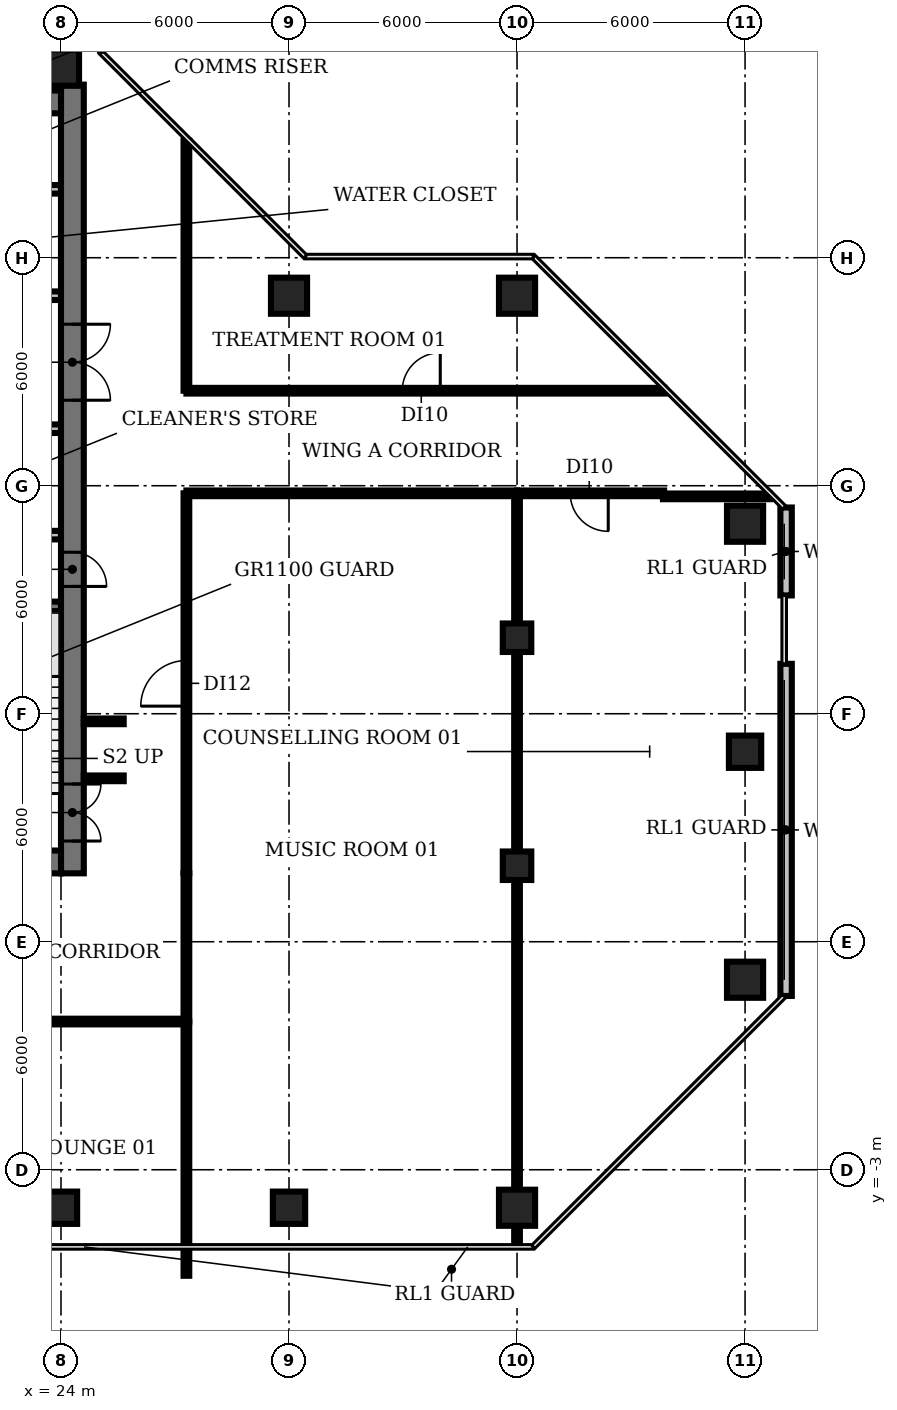
"""IFC4 building model, lengths in metres.
Left out: names, types, materials, properties, quantities, classifications, styles, units other than length and angle.
Written with IfcOpenShell. Run it as: python <this file> out.ifc"""

import sys

from ifc_helpers import new_model, si_unit, direction, frame, frame_2d, origin, origin_2d, place, context, subcontext, project, spatial, rectangle, circle, extrude, element, fill, save


model = new_model("IFC4")
c1 = context("Model", 3, precision=1e-05, world=origin(), true_north=direction((0.0, 1.0)))
c2 = subcontext(c1, "Body", "Model", "MODEL_VIEW")
j1 = project(units=[si_unit("LENGTHUNIT", "METRE"), si_unit("PLANEANGLEUNIT", "RADIAN")], contexts=[c1])
p1 = place(None, origin())
s1 = spatial("IfcSite", under=j1, at=p1, CompositionType="ELEMENT")
p2 = place(p1, origin())
s2 = spatial("IfcBuilding", under=s1, at=p2, CompositionType="ELEMENT")
p3 = place(p2, frame((0.0, 0.0, 150.8)))
s3 = spatial("IfcBuildingStorey", under=s2, at=p3, CompositionType="ELEMENT", Elevation=150.8)
p4 = place(p3, frame((24.0, -4.0, 0.0), z_axis=(0.0, 0.0, 1.0), x_axis=(1.0, 0.0, 0.0)))
e1 = element("IfcColumn", 1, at=p4, inside=s3, PredefinedType="COLUMN", context=c2, shape_type="SweptSolid", body=[
    extrude(rectangle(XDim=0.85, YDim=0.85, at=origin_2d()), origin(), (0.0, 0.0, 1.0), 3.85),
])
p5 = place(p3, frame((24.0, 26.0, 0.0), z_axis=(0.0, 0.0, 1.0), x_axis=(1.0, 0.0, 0.0)))
e2 = element("IfcColumn", 2, at=p5, inside=s3, PredefinedType="COLUMN", context=c2, shape_type="SweptSolid", body=[
    extrude(circle(Radius=0.475, at=origin_2d()), origin(), (0.0, 0.0, 1.0), 3.85),
])
p6 = place(p3, frame((30.0, -4.0, 0.0), z_axis=(0.0, 0.0, 1.0), x_axis=(1.0, 0.0, 0.0)))
e3 = element("IfcColumn", 3, at=p6, inside=s3, PredefinedType="COLUMN", context=c2, shape_type="SweptSolid", body=[
    extrude(rectangle(XDim=0.85, YDim=0.85, at=origin_2d()), origin(), (0.0, 0.0, 1.0), 3.85),
])
for number, where, z_axis, x_axis in (
    (4, (30.0, 20.0, 0.0), (0.0, 0.0, 1.0), (1.0, 0.0, 0.0)),
    (5, (36.0, -4.0, 0.0), (0.0, 0.0, 1.0), (1.0, 0.0, 0.0)),
):
    element("IfcColumn", number, at=place(p3, frame(where, z_axis=z_axis, x_axis=x_axis)), inside=s3, PredefinedType="COLUMN", context=c2, shape_type="SweptSolid", body=[
        extrude(circle(Radius=0.475, at=origin_2d()), origin(), (0.0, 0.0, 1.0), 3.85),
    ])
for number, where, z_axis, x_axis in (
    (6, (36.0, 5.0, 0.0), (0.0, 0.0, 1.0), (1.0, 0.0, 0.0)),
    (7, (36.0, 11.0, 0.0), (0.0, 0.0, 1.0), (1.0, 0.0, 0.0)),
):
    element("IfcColumn", number, at=place(p3, frame(where, z_axis=z_axis, x_axis=x_axis)), inside=s3, PredefinedType="COLUMN", context=c2, shape_type="SweptSolid", body=[
        extrude(rectangle(XDim=0.75, YDim=0.75, at=origin_2d()), origin(), (0.0, 0.0, 1.0), 3.85),
    ])
for number, where, z_axis, x_axis in (
    (8, (36.0, 20.0, 0.0), (0.0, 0.0, 1.0), (1.0, 0.0, 0.0)),
    (9, (42.0, 2.0, 0.0), (0.0, 0.0, 1.0), (1.0, 0.0, 0.0)),
):
    element("IfcColumn", number, at=place(p3, frame(where, z_axis=z_axis, x_axis=x_axis)), inside=s3, PredefinedType="COLUMN", context=c2, shape_type="SweptSolid", body=[
        extrude(circle(Radius=0.475, at=origin_2d()), origin(), (0.0, 0.0, 1.0), 3.85),
    ])
p7 = place(p3, frame((42.0, 8.0, 0.0), z_axis=(0.0, 0.0, 1.0), x_axis=(1.0, 0.0, 0.0)))
e10 = element("IfcColumn", 10, at=p7, inside=s3, PredefinedType="COLUMN", context=c2, shape_type="SweptSolid", body=[
    extrude(rectangle(XDim=0.85, YDim=0.85, at=origin_2d()), origin(), (0.0, 0.0, 1.0), 3.85),
])
p8 = place(p3, frame((42.0, 14.0, 0.0), z_axis=(0.0, 0.0, 1.0), x_axis=(1.0, 0.0, 0.0)))
e11 = element("IfcColumn", 11, at=p8, inside=s3, PredefinedType="COLUMN", context=c2, shape_type="SweptSolid", body=[
    extrude(circle(Radius=0.475, at=origin_2d()), origin(), (0.0, 0.0, 1.0), 3.85),
])
p9 = place(p3, frame((43.08, 1.573, 0.0), z_axis=(0.0, 0.0, 1.0), x_axis=(0.0, 1.0, 0.0)))
e12 = element("IfcWall", 12, at=p9, inside=s3, PredefinedType="SOLIDWALL", context=c2, shape_type="SweptSolid", body=[
    extrude(rectangle(XDim=8.74, YDim=0.3, at=frame_2d((4.37, 0.0))), origin(), (0.0, 0.0, 1.0), 3.85),
])
p10 = place(p3, frame((43.08, 12.113, 0.0), z_axis=(0.0, 0.0, 1.0), x_axis=(0.0, 1.0, 0.0)))
e13 = element("IfcWall", 13, at=p10, inside=s3, PredefinedType="SOLIDWALL", context=c2, shape_type="SweptSolid", body=[
    extrude(rectangle(XDim=2.313, YDim=0.3, at=frame_2d((1.157, 0.0))), origin(), (0.0, 0.0, 1.0), 3.85),
])
p11 = place(p3, frame((20.85, 11.825, 0.0), z_axis=(0.0, 0.0, 1.0), x_axis=(1.0, 0.0, 0.0)))
e14 = element("IfcWall", 14, at=p11, inside=s3, PredefinedType="SHEAR", context=c2, shape_type="SweptSolid", body=[
    extrude(rectangle(XDim=3.15, YDim=0.25, at=frame_2d((1.575, 0.0))), origin(), (0.0, 0.0, 1.0), 3.85),
])
p12 = place(p3, frame((16.6, 13.7, 0.0), z_axis=(0.0, 0.0, 1.0), x_axis=(1.0, 0.0, 0.0)))
e15 = element("IfcWall", 15, at=p12, inside=s3, PredefinedType="PARTITIONING", context=c2, shape_type="SweptSolid", body=[
    extrude(rectangle(XDim=7.4, YDim=0.225, at=frame_2d((3.7, 0.0))), origin(), (0.0, 0.0, 1.0), 3.85),
])
p13 = place(p3, frame((9.4, 16.5, 0.0), z_axis=(0.0, 0.0, 1.0), x_axis=(1.0, 0.0, 0.0)))
e16 = element("IfcWall", 16, at=p13, inside=s3, PredefinedType="PARTITIONING", context=c2, shape_type="SweptSolid", body=[
    extrude(rectangle(XDim=14.6, YDim=0.225, at=frame_2d((7.3, 0.0))), origin(), (0.0, 0.0, 1.0), 3.85),
])
p14 = place(p13, frame((1.9, 0.0, 0.0)))
e17 = element("IfcOpeningElement", 17, at=p14, cuts=e16, PredefinedType="OPENING", context=c2, shape_type="SweptSolid", body=[
    extrude(rectangle(XDim=1.0, YDim=2.1, at=frame_2d((0.5, 1.05))), frame((0.0, 0.123, 0.0), z_axis=(0.0, -1.0, 0.0), x_axis=(1.0, 0.0, 0.0)), (0.0, 0.0, 1.0), 0.245),
])
p15 = place(p13, frame((7.475, 0.0, 0.0)))
e18 = element("IfcOpeningElement", 18, at=p15, cuts=e16, PredefinedType="OPENING", context=c2, shape_type="SweptSolid", body=[
    extrude(rectangle(XDim=1.0, YDim=2.1, at=frame_2d((0.5, 1.05))), frame((0.0, 0.123, 0.0), z_axis=(0.0, -1.0, 0.0), x_axis=(1.0, 0.0, 0.0)), (0.0, 0.0, 1.0), 0.245),
])
p16 = place(p13, frame((12.4, 0.0, 0.0)))
e19 = element("IfcOpeningElement", 19, at=p16, cuts=e16, PredefinedType="OPENING", context=c2, shape_type="SweptSolid", body=[
    extrude(rectangle(XDim=1.0, YDim=2.1, at=frame_2d((0.5, 1.05))), frame((0.0, 0.123, 0.0), z_axis=(0.0, -1.0, 0.0), x_axis=(1.0, 0.0, 0.0)), (0.0, 0.0, 1.0), 0.245),
])
p17 = place(p3, frame((24.0, 20.0, 0.0), z_axis=(0.0, 0.0, 1.0), x_axis=(-1.0, 0.0, 0.0)))
e20 = element("IfcWall", 20, at=p17, inside=s3, PredefinedType="PARTITIONING", context=c2, shape_type="SweptSolid", body=[
    extrude(rectangle(XDim=14.6, YDim=0.225, at=frame_2d((7.3, 0.0))), origin(), (0.0, 0.0, 1.0), 3.85),
])
p18 = place(p17, frame((12.75, 0.0, 0.0)))
e21 = element("IfcOpeningElement", 21, at=p18, cuts=e20, PredefinedType="OPENING", context=c2, shape_type="SweptSolid", body=[
    extrude(rectangle(XDim=1.1, YDim=2.1, at=frame_2d((0.55, 1.05))), frame((0.0, 0.123, 0.0), z_axis=(0.0, -1.0, 0.0), x_axis=(1.0, 0.0, 0.0)), (0.0, 0.0, 1.0), 0.245),
])
p19 = place(p17, frame((9.95, 0.0, 0.0)))
e22 = element("IfcOpeningElement", 22, at=p19, cuts=e20, PredefinedType="OPENING", context=c2, shape_type="SweptSolid", body=[
    extrude(rectangle(XDim=1.1, YDim=2.1, at=frame_2d((0.55, 1.05))), frame((0.0, 0.123, 0.0), z_axis=(0.0, -1.0, 0.0), x_axis=(1.0, 0.0, 0.0)), (0.0, 0.0, 1.0), 0.245),
])
p20 = place(p17, frame((7.15, 0.0, 0.0)))
e23 = element("IfcOpeningElement", 23, at=p20, cuts=e20, PredefinedType="OPENING", context=c2, shape_type="SweptSolid", body=[
    extrude(rectangle(XDim=1.1, YDim=2.1, at=frame_2d((0.55, 1.05))), frame((0.0, 0.123, 0.0), z_axis=(0.0, -1.0, 0.0), x_axis=(1.0, 0.0, 0.0)), (0.0, 0.0, 1.0), 0.245),
])
p21 = place(p17, frame((4.35, 0.0, 0.0)))
e24 = element("IfcOpeningElement", 24, at=p21, cuts=e20, PredefinedType="OPENING", context=c2, shape_type="SweptSolid", body=[
    extrude(rectangle(XDim=1.1, YDim=2.1, at=frame_2d((0.55, 1.05))), frame((0.0, 0.123, 0.0), z_axis=(0.0, -1.0, 0.0), x_axis=(1.0, 0.0, 0.0)), (0.0, 0.0, 1.0), 0.245),
])
p22 = place(p17, frame((1.2, 0.0, 0.0)))
e25 = element("IfcOpeningElement", 25, at=p22, cuts=e20, PredefinedType="OPENING", context=c2, shape_type="SweptSolid", body=[
    extrude(rectangle(XDim=1.0, YDim=2.1, at=frame_2d((0.5, 1.05))), frame((0.0, 0.123, 0.0), z_axis=(0.0, -1.0, 0.0), x_axis=(1.0, 0.0, 0.0)), (0.0, 0.0, 1.0), 0.245),
])
p23 = place(p3, frame((9.4, 22.8, 0.0), z_axis=(0.0, 0.0, 1.0), x_axis=(1.0, 0.0, 0.0)))
e26 = element("IfcWall", 26, at=p23, inside=s3, PredefinedType="PARTITIONING", context=c2, shape_type="SweptSolid", body=[
    extrude(rectangle(XDim=14.6, YDim=0.225, at=frame_2d((7.3, 0.0))), origin(), (0.0, 0.0, 1.0), 3.85),
])
p24 = place(p3, frame((24.3, 25.555, 0.0), z_axis=(0.0, 0.0, 1.0), x_axis=(0.0, -1.0, 0.0)))
e27 = element("IfcWall", 27, at=p24, inside=s3, PredefinedType="SHEAR", context=c2, shape_type="SweptSolid", body=[
    extrude(rectangle(XDim=20.755, YDim=0.6, at=frame_2d((10.377, 0.0))), origin(), (0.0, 0.0, 1.0), 3.85),
])
p25 = place(p24, frame((18.405, 0.0, 0.0)))
e28 = element("IfcOpeningElement", 28, at=p25, cuts=e27, PredefinedType="OPENING", context=c2, shape_type="SweptSolid", body=[
    extrude(rectangle(XDim=1.5, YDim=2.1, at=frame_2d((0.75, 1.05))), frame((0.0, 0.31, 0.0), z_axis=(0.0, -1.0, 0.0), x_axis=(1.0, 0.0, 0.0)), (0.0, 0.0, 1.0), 0.62),
])
p26 = place(p24, frame((12.305, 0.0, 0.0)))
e29 = element("IfcOpeningElement", 29, at=p26, cuts=e27, PredefinedType="OPENING", context=c2, shape_type="SweptSolid", body=[
    extrude(rectangle(XDim=0.9, YDim=2.1, at=frame_2d((0.45, 1.05))), frame((0.0, 0.31, 0.0), z_axis=(0.0, -1.0, 0.0), x_axis=(1.0, 0.0, 0.0)), (0.0, 0.0, 1.0), 0.62),
])
p27 = place(p24, frame((6.305, 0.0, 0.0)))
e30 = element("IfcOpeningElement", 30, at=p27, cuts=e27, PredefinedType="OPENING", context=c2, shape_type="SweptSolid", body=[
    extrude(rectangle(XDim=2.0, YDim=2.1, at=frame_2d((1.0, 1.05))), frame((0.0, 0.31, 0.0), z_axis=(0.0, -1.0, 0.0), x_axis=(1.0, 0.0, 0.0)), (0.0, 0.0, 1.0), 0.62),
])
p28 = place(p3, frame((24.0, 5.1, 0.0), z_axis=(0.0, 0.0, 1.0), x_axis=(-1.0, 0.0, 0.0)))
e31 = element("IfcWall", 31, at=p28, inside=s3, PredefinedType="SHEAR", context=c2, shape_type="SweptSolid", body=[
    extrude(rectangle(XDim=18.0, YDim=0.6, at=frame_2d((9.0, 0.0))), origin(), (0.0, 0.0, 1.0), 3.85),
])
p29 = place(p28, frame((13.0, 0.0, 0.0)))
e32 = element("IfcOpeningElement", 32, at=p29, cuts=e31, PredefinedType="OPENING", context=c2, shape_type="SweptSolid", body=[
    extrude(rectangle(XDim=1.2, YDim=2.1, at=frame_2d((0.6, 1.05))), frame((0.0, 0.31, 0.0), z_axis=(0.0, -1.0, 0.0), x_axis=(1.0, 0.0, 0.0)), (0.0, 0.0, 1.0), 0.62),
])
p30 = place(p28, frame((4.9, 0.0, 0.0)))
e33 = element("IfcOpeningElement", 33, at=p30, cuts=e31, PredefinedType="OPENING", context=c2, shape_type="SweptSolid", body=[
    extrude(rectangle(XDim=1.0, YDim=2.1, at=frame_2d((0.5, 1.05))), frame((0.0, 0.31, 0.0), z_axis=(0.0, -1.0, 0.0), x_axis=(1.0, 0.0, 0.0)), (0.0, 0.0, 1.0), 0.62),
])
p31 = place(p3, frame((6.0, 25.1, 0.0), z_axis=(0.0, 0.0, 1.0), x_axis=(1.0, 0.0, 0.0)))
e34 = element("IfcWall", 34, at=p31, inside=s3, PredefinedType="SHEAR", context=c2, shape_type="SweptSolid", body=[
    extrude(rectangle(XDim=18.0, YDim=0.6, at=frame_2d((9.0, 0.0))), origin(), (0.0, 0.0, 1.0), 3.85),
])
for number, where, z_axis, x_axis in (
    (35, (24.6, 7.3, 0.0), (0.0, 0.0, 1.0), (1.0, 0.0, 0.0)),
    (36, (24.6, 8.8, 0.0), (0.0, 0.0, 1.0), (1.0, 0.0, 0.0)),
):
    element("IfcWall", number, at=place(p3, frame(where, z_axis=z_axis, x_axis=x_axis)), inside=s3, PredefinedType="PARTITIONING", context=c2, shape_type="SweptSolid", body=[
        extrude(rectangle(XDim=1.05, YDim=0.15, at=frame_2d((0.525, 0.0))), origin(), (0.0, 0.0, 1.0), 2.88),
    ])
p32 = place(p3, frame((27.3, -5.79, 0.0), z_axis=(0.0, 0.0, 1.0), x_axis=(0.0, 1.0, 0.0)))
e37 = element("IfcWall", 37, at=p32, inside=s3, PredefinedType="PARTITIONING", context=c2, shape_type="SweptSolid", body=[
    extrude(rectangle(XDim=6.69, YDim=0.15, at=frame_2d((3.345, 0.0))), origin(), (0.0, 0.0, 1.0), 2.88),
])
p33 = place(p3, frame((27.3, 0.9, 0.0), z_axis=(0.0, 0.0, 1.0), x_axis=(-1.0, 0.0, 0.0)))
e38 = element("IfcWall", 38, at=p33, inside=s3, PredefinedType="PARTITIONING", context=c2, shape_type="SweptSolid", body=[
    extrude(rectangle(XDim=24.6, YDim=0.15, at=frame_2d((12.3, 0.0))), origin(), (0.0, 0.0, 1.0), 2.88),
])
p34 = place(p33, frame((11.8, 0.0, 0.0)))
e39 = element("IfcOpeningElement", 39, at=p34, cuts=e38, PredefinedType="OPENING", context=c2, shape_type="SweptSolid", body=[
    extrude(rectangle(XDim=1.2, YDim=2.1, at=frame_2d((0.6, 1.05))), frame((0.0, 0.085, 0.0), z_axis=(0.0, -1.0, 0.0), x_axis=(1.0, 0.0, 0.0)), (0.0, 0.0, 1.0), 0.17),
])
p35 = place(p3, frame((27.3, 0.9, 0.0), z_axis=(0.0, 0.0, 1.0), x_axis=(0.0, 1.0, 0.0)))
e40 = element("IfcWall", 40, at=p35, inside=s3, PredefinedType="PARTITIONING", context=c2, shape_type="SweptSolid", body=[
    extrude(rectangle(XDim=3.9, YDim=0.15, at=frame_2d((1.95, 0.0))), origin(), (0.0, 0.0, 1.0), 2.88),
])
p36 = place(p3, frame((27.3, 4.8, 0.0), z_axis=(0.0, 0.0, 1.0), x_axis=(0.0, 1.0, 0.0)))
e41 = element("IfcWall", 41, at=p36, inside=s3, PredefinedType="PARTITIONING", context=c2, shape_type="SweptSolid", body=[
    extrude(rectangle(XDim=10.0, YDim=0.15, at=frame_2d((5.0, 0.0))), origin(), (0.0, 0.0, 1.0), 2.88),
])
p37 = place(p36, frame((4.4, 0.0, 0.0)))
e42 = element("IfcOpeningElement", 42, at=p37, cuts=e41, PredefinedType="OPENING", context=c2, shape_type="SweptSolid", body=[
    extrude(rectangle(XDim=1.2, YDim=2.1, at=frame_2d((0.6, 1.05))), frame((0.0, 0.085, 0.0), z_axis=(0.0, -1.0, 0.0), x_axis=(1.0, 0.0, 0.0)), (0.0, 0.0, 1.0), 0.17),
])
p38 = place(p3, frame((27.3, 14.8, 0.0), z_axis=(0.0, 0.0, 1.0), x_axis=(1.0, 0.0, 0.0)))
e43 = element("IfcWall", 43, at=p38, inside=s3, PredefinedType="PARTITIONING", context=c2, shape_type="SweptSolid", body=[
    extrude(rectangle(XDim=8.7, YDim=0.15, at=frame_2d((4.35, 0.0))), origin(), (0.0, 0.0, 1.0), 2.88),
])
p39 = place(p3, frame((27.3, 17.5, 0.0), z_axis=(0.0, 0.0, 1.0), x_axis=(0.0, 1.0, 0.0)))
e44 = element("IfcWall", 44, at=p39, inside=s3, PredefinedType="PARTITIONING", context=c2, shape_type="SweptSolid", body=[
    extrude(rectangle(XDim=6.58, YDim=0.15, at=frame_2d((3.29, 0.0))), origin(), (0.0, 0.0, 1.0), 2.88),
])
p40 = place(p3, frame((27.3, 17.5, 0.0), z_axis=(0.0, 0.0, 1.0), x_axis=(1.0, 0.0, 0.0)))
e45 = element("IfcWall", 45, at=p40, inside=s3, PredefinedType="PARTITIONING", context=c2, shape_type="SweptSolid", body=[
    extrude(rectangle(XDim=12.58, YDim=0.15, at=frame_2d((6.29, 0.0))), origin(), (0.0, 0.0, 1.0), 2.88),
])
p41 = place(p40, frame((5.68, 0.0, 0.0)))
e46 = element("IfcOpeningElement", 46, at=p41, cuts=e45, PredefinedType="OPENING", context=c2, shape_type="SweptSolid", body=[
    extrude(rectangle(XDim=1.0, YDim=2.1, at=frame_2d((0.5, 1.05))), frame((0.0, 0.085, 0.0), z_axis=(0.0, -1.0, 0.0), x_axis=(1.0, 0.0, 0.0)), (0.0, 0.0, 1.0), 0.17),
])
p42 = place(p3, frame((36.0, -4.97, 0.0), z_axis=(0.0, 0.0, 1.0), x_axis=(0.0, 1.0, 0.0)))
e47 = element("IfcWall", 47, at=p42, inside=s3, PredefinedType="PARTITIONING", context=c2, shape_type="SweptSolid", body=[
    extrude(rectangle(XDim=19.77, YDim=0.15, at=frame_2d((9.885, 0.0))), origin(), (0.0, 0.0, 1.0), 2.88),
])
p43 = place(p3, frame((39.84, 14.72, 0.0), z_axis=(0.0, 0.0, 1.0), x_axis=(1.0, 0.0, 0.0)))
e48 = element("IfcWall", 48, at=p43, inside=s3, PredefinedType="PARTITIONING", context=c2, shape_type="SweptSolid", body=[
    extrude(rectangle(XDim=2.812, YDim=0.15, at=frame_2d((1.406, 0.0))), origin(), (0.0, 0.0, 1.0), 2.88),
])
p44 = place(p3, frame((39.87, 14.8, 0.0), z_axis=(0.0, 0.0, 1.0), x_axis=(-1.0, 0.0, 0.0)))
e49 = element("IfcWall", 49, at=p44, inside=s3, PredefinedType="PARTITIONING", context=c2, shape_type="SweptSolid", body=[
    extrude(rectangle(XDim=3.87, YDim=0.15, at=frame_2d((1.935, 0.0))), origin(), (0.0, 0.0, 1.0), 2.88),
])
p45 = place(p44, frame((1.47, 0.0, 0.0)))
e50 = element("IfcOpeningElement", 50, at=p45, cuts=e49, PredefinedType="OPENING", context=c2, shape_type="SweptSolid", body=[
    extrude(rectangle(XDim=1.0, YDim=2.1, at=frame_2d((0.5, 1.05))), frame((0.0, 0.085, 0.0), z_axis=(0.0, -1.0, 0.0), x_axis=(1.0, 0.0, 0.0)), (0.0, 0.0, 1.0), 0.17),
])
p46 = place(p25, origin())
e51 = element("IfcDoor", 51, at=p46, inside=s3, OperationType="DOUBLE_DOOR_SINGLE_SWING", PredefinedType="DOOR", context=c2, shape_type="SweptSolid", body=[
    extrude(rectangle(XDim=1.5, YDim=2.1, at=frame_2d((0.75, 1.05))), frame((0.0, 0.025, 0.0), z_axis=(0.0, -1.0, 0.0), x_axis=(1.0, 0.0, 0.0)), (0.0, 0.0, 1.0), 0.05),
])
fill(e28, e51)
p47 = place(p26, origin())
e52 = element("IfcDoor", 52, at=p47, inside=s3, OperationType="SINGLE_SWING_RIGHT", PredefinedType="DOOR", context=c2, shape_type="SweptSolid", body=[
    extrude(rectangle(XDim=0.9, YDim=2.1, at=frame_2d((0.45, 1.05))), frame((0.0, -0.24, 0.0), z_axis=(0.0, -1.0, 0.0), x_axis=(1.0, 0.0, 0.0)), (0.0, 0.0, 1.0), 0.05),
])
fill(e29, e52)
p48 = place(p27, origin())
e53 = element("IfcDoor", 53, at=p48, inside=s3, OperationType="DOUBLE_DOOR_SINGLE_SWING", PredefinedType="DOOR", context=c2, shape_type="SweptSolid", body=[
    extrude(rectangle(XDim=2.0, YDim=2.1, at=frame_2d((1.0, 1.05))), frame((0.0, 0.025, 0.0), z_axis=(0.0, -1.0, 0.0), x_axis=(1.0, 0.0, 0.0)), (0.0, 0.0, 1.0), 0.05),
])
fill(e30, e53)
p49 = place(p37, origin())
e54 = element("IfcDoor", 54, at=p49, inside=s3, OperationType="SINGLE_SWING_LEFT", PredefinedType="DOOR", context=c2, shape_type="SweptSolid", body=[
    extrude(rectangle(XDim=1.2, YDim=2.1, at=frame_2d((0.6, 1.05))), frame((0.0, 0.025, 0.0), z_axis=(0.0, -1.0, 0.0), x_axis=(1.0, 0.0, 0.0)), (0.0, 0.0, 1.0), 0.05),
])
fill(e42, e54)
p50 = place(p41, origin())
e55 = element("IfcDoor", 55, at=p50, inside=s3, OperationType="SINGLE_SWING_RIGHT", PredefinedType="DOOR", context=c2, shape_type="SweptSolid", body=[
    extrude(rectangle(XDim=1.0, YDim=2.1, at=frame_2d((0.5, 1.05))), frame((0.0, 0.025, 0.0), z_axis=(0.0, -1.0, 0.0), x_axis=(1.0, 0.0, 0.0)), (0.0, 0.0, 1.0), 0.05),
])
fill(e46, e55)
p51 = place(p45, origin())
e56 = element("IfcDoor", 56, at=p51, inside=s3, OperationType="SINGLE_SWING_LEFT", PredefinedType="DOOR", context=c2, shape_type="SweptSolid", body=[
    extrude(rectangle(XDim=1.0, YDim=2.1, at=frame_2d((0.5, 1.05))), frame((0.0, 0.025, 0.0), z_axis=(0.0, -1.0, 0.0), x_axis=(1.0, 0.0, 0.0)), (0.0, 0.0, 1.0), 0.05),
])
fill(e50, e56)
save(model, sys.argv[1])
